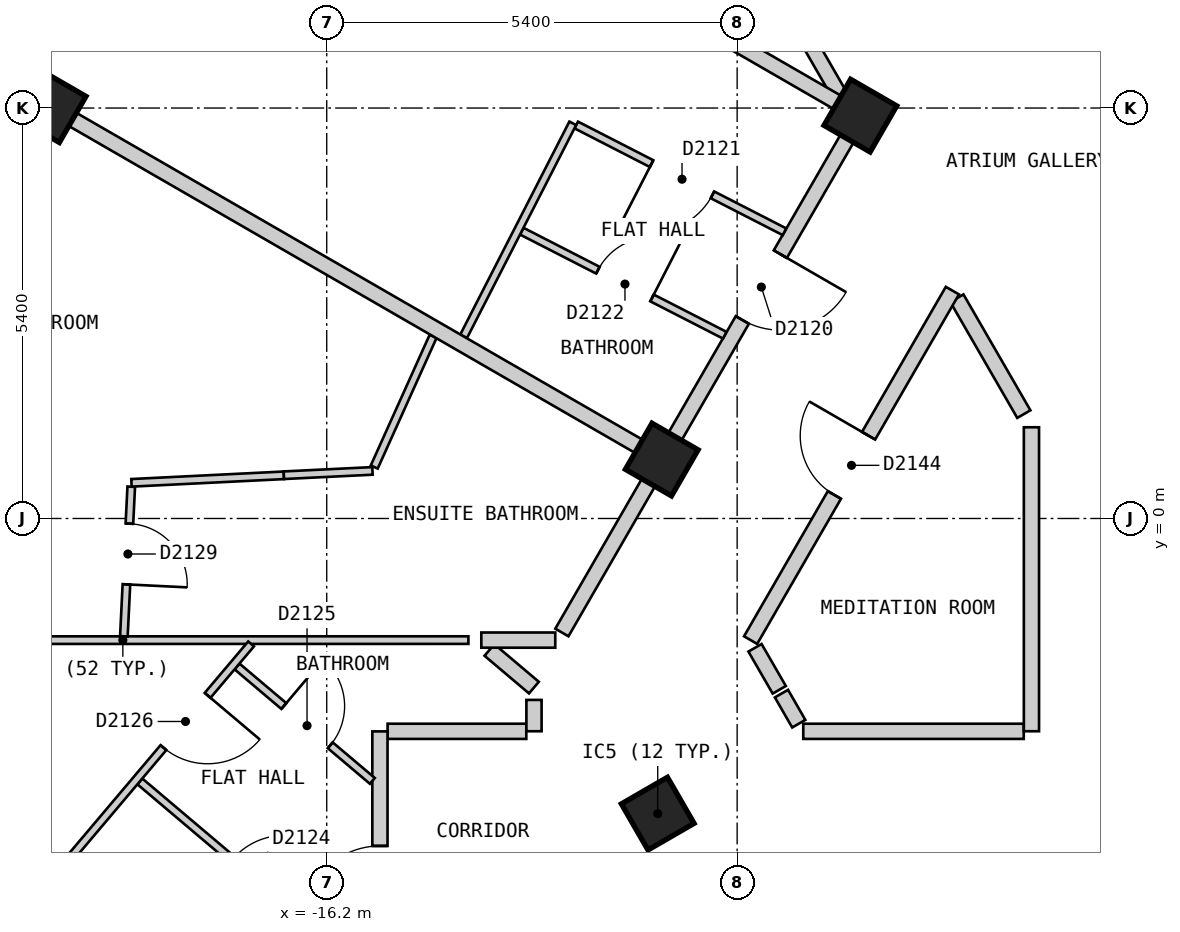
"""IFC4 building model, lengths in metres.
Left out: names, types, materials, properties, quantities, classifications, styles, units other than length and angle.
Written with IfcOpenShell. Run it as: python <this file> out.ifc"""

import sys

from ifc_helpers import new_model, si_unit, direction, frame, frame_2d, origin, origin_2d, place, context, subcontext, project, spatial, polyline, rectangle, outline, extrude, element, fill, save


model = new_model("IFC4")
c1 = context("Model", 3, precision=1e-05, world=origin(), true_north=direction((0.0, 1.0)))
c2 = subcontext(c1, "Body", "Model", "MODEL_VIEW")
j1 = project(units=[si_unit("LENGTHUNIT", "METRE"), si_unit("PLANEANGLEUNIT", "RADIAN")], contexts=[c1])
p1 = place(None, origin())
s1 = spatial("IfcSite", under=j1, at=p1, CompositionType="ELEMENT")
p2 = place(p1, origin())
s2 = spatial("IfcBuilding", under=s1, at=p2, CompositionType="ELEMENT")
p3 = place(p2, frame((0.0, 0.0, 205.8)))
s3 = spatial("IfcBuildingStorey", under=s2, at=p3, CompositionType="ELEMENT", Elevation=205.8)
for number, where, z_axis, x_axis in (
    (1, (-19.846, 5.425, 0.0), (0.0, 0.0, 1.0), (-0.5, -0.866, 0.0)),
    (2, (-11.845, -3.883, 0.0), (0.0, 0.0, 1.0), (0.5, -0.866, 0.0)),
    (3, (-9.179, 5.3, 0.0), (0.0, 0.0, 1.0), (-0.5, -0.866, 0.0)),
    (4, (-11.792, 0.775, 0.0), (0.0, 0.0, 1.0), (-0.5, -0.866, 0.0)),
):
    element("IfcColumn", number, at=place(p3, frame(where, z_axis=z_axis, x_axis=x_axis)), inside=s3, PredefinedType="COLUMN", context=c2, shape_type="SweptSolid", body=[
        extrude(rectangle(XDim=0.7, YDim=0.7, at=origin_2d()), origin(), (0.0, 0.0, 1.0), 3.0),
    ])
p4 = place(p3, frame((-12.514, 20.025, 0.0), z_axis=(0.0, 0.0, 1.0), x_axis=(-0.500003656944, -0.866023292436, 0.0)))
e5 = element("IfcWall", 5, at=p4, inside=s3, PredefinedType="SOLIDWALL", context=c2, shape_type="SweptSolid", body=[
    extrude(outline(polyline([(0.0, -0.15), (22.17, -0.15), (22.09, 0.15), (0.08, 0.15), (0.0, -0.15)])), origin(), (0.0, 0.0, 1.0), 2.7),
])
p5 = place(p4, frame((2.497, 0.0, 0.15)))
e6 = element("IfcOpeningElement", 6, at=p5, cuts=e5, PredefinedType="OPENING", context=c2, shape_type="SweptSolid", body=[
    extrude(rectangle(XDim=1.5, YDim=2.1, at=frame_2d((0.75, 1.05))), frame((0.0, 0.16, 0.0), z_axis=(0.0, -1.0, 0.0), x_axis=(1.0, 0.0, 0.0)), (0.0, 0.0, 1.0), 0.32),
])
p6 = place(p4, frame((7.722, 0.0, 0.15)))
e7 = element("IfcOpeningElement", 7, at=p6, cuts=e5, PredefinedType="OPENING", context=c2, shape_type="SweptSolid", body=[
    extrude(rectangle(XDim=1.5, YDim=2.1, at=frame_2d((0.75, 1.05))), frame((0.0, 0.16, 0.0), z_axis=(0.0, -1.0, 0.0), x_axis=(1.0, 0.0, 0.0)), (0.0, 0.0, 1.0), 0.32),
])
p7 = place(p4, frame((12.948, 0.0, 0.15)))
e8 = element("IfcOpeningElement", 8, at=p7, cuts=e5, PredefinedType="OPENING", context=c2, shape_type="SweptSolid", body=[
    extrude(rectangle(XDim=1.5, YDim=2.1, at=frame_2d((0.75, 1.05))), frame((0.0, 0.16, 0.0), z_axis=(0.0, -1.0, 0.0), x_axis=(1.0, 0.0, 0.0)), (0.0, 0.0, 1.0), 0.32),
])
p8 = place(p4, frame((18.173, 0.0, 0.15)))
e9 = element("IfcOpeningElement", 9, at=p8, cuts=e5, PredefinedType="OPENING", context=c2, shape_type="SweptSolid", body=[
    extrude(rectangle(XDim=1.5, YDim=2.1, at=frame_2d((0.75, 1.05))), frame((0.0, 0.16, 0.0), z_axis=(0.0, -1.0, 0.0), x_axis=(1.0, 0.0, 0.0)), (0.0, 0.0, 1.0), 0.32),
])
p9 = place(p3, frame((-23.599, -4.025, 0.0), z_axis=(0.0, 0.0, 1.0), x_axis=(0.500012653391, -0.866018098222, 0.0)))
e10 = element("IfcWall", 10, at=p9, inside=s3, PredefinedType="SOLIDWALL", context=c2, shape_type="SweptSolid", body=[
    extrude(outline(polyline([(0.0, -0.15), (16.628, -0.15), (16.548, 0.15), (0.08, 0.15), (0.0, -0.15)])), origin(), (0.0, 0.0, 1.0), 2.7),
])
p10 = place(p9, frame((2.444, 0.0, 0.15)))
e11 = element("IfcOpeningElement", 11, at=p10, cuts=e10, PredefinedType="OPENING", context=c2, shape_type="SweptSolid", body=[
    extrude(rectangle(XDim=1.5, YDim=2.1, at=frame_2d((0.75, 1.05))), frame((0.0, 0.16, 0.0), z_axis=(0.0, -1.0, 0.0), x_axis=(1.0, 0.0, 0.0)), (0.0, 0.0, 1.0), 0.32),
])
p11 = place(p9, frame((7.564, 0.0, 0.15)))
e12 = element("IfcOpeningElement", 12, at=p11, cuts=e10, PredefinedType="OPENING", context=c2, shape_type="SweptSolid", body=[
    extrude(rectangle(XDim=1.5, YDim=2.1, at=frame_2d((0.75, 1.05))), frame((0.0, 0.16, 0.0), z_axis=(0.0, -1.0, 0.0), x_axis=(1.0, 0.0, 0.0)), (0.0, 0.0, 1.0), 0.32),
])
p12 = place(p9, frame((12.682, 0.0, 0.15)))
e13 = element("IfcOpeningElement", 13, at=p12, cuts=e10, PredefinedType="OPENING", context=c2, shape_type="SweptSolid", body=[
    extrude(rectangle(XDim=1.5, YDim=2.1, at=frame_2d((0.75, 1.05))), frame((0.0, 0.16, 0.0), z_axis=(0.0, -1.0, 0.0), x_axis=(1.0, 0.0, 0.0)), (0.0, 0.0, 1.0), 0.32),
])
p13 = place(p3, frame((-10.796, 7.9, 0.0), z_axis=(0.0, 0.0, 1.0), x_axis=(0.499698840221, -0.866199208659, 0.0)))
e14 = element("IfcWall", 14, at=p13, inside=s3, PredefinedType="PARTITIONING", context=c2, shape_type="SweptSolid", body=[
    extrude(rectangle(XDim=2.685, YDim=0.2, at=frame_2d((1.343, 0.0))), origin(), (0.0, 0.0, 1.0), 2.7),
])
p14 = place(p3, frame((-7.909, 2.898, 0.0), z_axis=(0.0, 0.0, 1.0), x_axis=(0.50019444547, -0.865913111531, 0.0)))
e15 = element("IfcWall", 15, at=p14, inside=s3, PredefinedType="PARTITIONING", context=c2, shape_type="SweptSolid", body=[
    extrude(rectangle(XDim=1.761, YDim=0.2, at=frame_2d((0.88, 0.0))), origin(), (0.0, 0.0, 1.0), 2.7),
])
p15 = place(p3, frame((-10.565, -1.701, 0.0), z_axis=(0.0, 0.0, 1.0), x_axis=(0.499512735409, -0.866306543416, 0.0)))
e16 = element("IfcWall", 16, at=p15, inside=s3, PredefinedType="PARTITIONING", context=c2, shape_type="SweptSolid", body=[
    extrude(rectangle(XDim=0.638, YDim=0.2, at=frame_2d((0.319, 0.0))), origin(), (0.0, 0.0, 1.0), 2.7),
])
p16 = place(p3, frame((-10.217, -2.304, 0.0), z_axis=(0.0, 0.0, 1.0), x_axis=(0.499013081552, -0.866594452117, 0.0)))
e17 = element("IfcWall", 17, at=p16, inside=s3, PredefinedType="PARTITIONING", context=c2, shape_type="SweptSolid", body=[
    extrude(rectangle(XDim=0.457, YDim=0.2, at=frame_2d((0.229, 0.0))), origin(), (0.0, 0.0, 1.0), 2.7),
])
p17 = place(p3, frame((-15.399, -2.8, 0.0), z_axis=(0.0, 0.0, 1.0), x_axis=(1.0, 0.0, 0.0)))
e18 = element("IfcWall", 18, at=p17, inside=s3, PredefinedType="PARTITIONING", context=c2, shape_type="SweptSolid", body=[
    extrude(rectangle(XDim=1.825, YDim=0.2, at=frame_2d((0.913, 0.0))), origin(), (0.0, 0.0, 1.0), 2.7),
])
p18 = place(p3, frame((-9.93, -2.8, 0.0), z_axis=(0.0, 0.0, 1.0), x_axis=(1.0, 0.0, 0.0)))
e19 = element("IfcWall", 19, at=p18, inside=s3, PredefinedType="PARTITIONING", context=c2, shape_type="SweptSolid", body=[
    extrude(rectangle(XDim=2.901, YDim=0.2, at=frame_2d((1.45, 0.0))), origin(), (0.0, 0.0, 1.0), 2.7),
])
p19 = place(p3, frame((-10.623, -1.6, 0.0), z_axis=(0.0, 0.0, 1.0), x_axis=(0.500040865889, 0.866001808567, 0.0)))
e20 = element("IfcWall", 20, at=p19, inside=s3, PredefinedType="PARTITIONING", context=c2, shape_type="SweptSolid", body=[
    extrude(rectangle(XDim=5.31, YDim=0.2, at=frame_2d((2.655, 0.0))), origin(), (0.0, 0.0, 1.0), 2.7),
])
p20 = place(p19, frame((2.205, 0.0, 0.0)))
e21 = element("IfcOpeningElement", 21, at=p20, cuts=e20, PredefinedType="OPENING", context=c2, shape_type="SweptSolid", body=[
    extrude(rectangle(XDim=0.9, YDim=2.1, at=frame_2d((0.45, 1.05))), frame((0.0, 0.11, 0.0), z_axis=(0.0, -1.0, 0.0), x_axis=(1.0, 0.0, 0.0)), (0.0, 0.0, 1.0), 0.22),
])
p21 = place(p3, frame((-13.106, -1.5, 0.0), z_axis=(0.0, 0.0, 1.0), x_axis=(0.500025705601, 0.86601056214, 0.0)))
e22 = element("IfcWall", 22, at=p21, inside=s3, PredefinedType="PARTITIONING", context=c2, shape_type="SweptSolid", body=[
    extrude(rectangle(XDim=7.735, YDim=0.2, at=frame_2d((3.868, 0.0))), origin(), (0.0, 0.0, 1.0), 2.7),
])
p22 = place(p21, frame((4.748, 0.0, 0.0)))
e23 = element("IfcOpeningElement", 23, at=p22, cuts=e22, PredefinedType="OPENING", context=c2, shape_type="SweptSolid", body=[
    extrude(rectangle(XDim=1.0, YDim=2.1, at=frame_2d((0.5, 1.05))), frame((0.0, 0.11, 0.0), z_axis=(0.0, -1.0, 0.0), x_axis=(1.0, 0.0, 0.0)), (0.0, 0.0, 1.0), 0.22),
])
p23 = place(p3, frame((-6.928, -2.799, 0.0), z_axis=(0.0, 0.0, 1.0), x_axis=(0.0, 1.0, 0.0)))
e24 = element("IfcWall", 24, at=p23, inside=s3, PredefinedType="PARTITIONING", context=c2, shape_type="SweptSolid", body=[
    extrude(rectangle(XDim=3.999, YDim=0.2, at=frame_2d((2.0, 0.0))), origin(), (0.0, 0.0, 1.0), 2.7),
])
p24 = place(p3, frame((-13.473, -2.799, 0.0), z_axis=(0.0, 0.0, 1.0), x_axis=(0.0, 1.0, 0.0)))
e25 = element("IfcWall", 25, at=p24, inside=s3, PredefinedType="PARTITIONING", context=c2, shape_type="SweptSolid", body=[
    extrude(rectangle(XDim=0.412, YDim=0.2, at=frame_2d((0.206, 0.0))), origin(), (0.0, 0.0, 1.0), 2.7),
])
p25 = place(p3, frame((-15.5, -6.599, 0.0), z_axis=(0.0, 0.0, 1.0), x_axis=(0.0, 1.0, 0.0)))
e26 = element("IfcWall", 26, at=p25, inside=s3, PredefinedType="PARTITIONING", context=c2, shape_type="SweptSolid", body=[
    extrude(rectangle(XDim=3.798, YDim=0.2, at=frame_2d((1.899, 0.0))), origin(), (0.0, 0.0, 1.0), 2.7),
])
p26 = place(p25, frame((1.291, 0.0, 0.0)))
e27 = element("IfcOpeningElement", 27, at=p26, cuts=e26, PredefinedType="OPENING", context=c2, shape_type="SweptSolid", body=[
    extrude(rectangle(XDim=1.0, YDim=2.1, at=frame_2d((0.5, 1.05))), frame((0.0, 0.11, 0.0), z_axis=(0.0, -1.0, 0.0), x_axis=(1.0, 0.0, 0.0)), (0.0, 0.0, 1.0), 0.22),
])
p27 = place(p3, frame((-12.917, 5.177, 0.0), z_axis=(0.0, 0.0, 1.0), x_axis=(0.889829844516, -0.456292502467, 0.0)))
e28 = element("IfcWall", 28, at=p27, inside=s3, PredefinedType="PARTITIONING", context=c2, shape_type="SweptSolid", body=[
    extrude(rectangle(XDim=3.079, YDim=0.1, at=frame_2d((1.54, 0.0))), origin(), (0.0, 0.0, 1.0), 2.7),
])
p28 = place(p27, frame((1.114, 0.0, 0.0)))
e29 = element("IfcOpeningElement", 29, at=p28, cuts=e28, PredefinedType="OPENING", context=c2, shape_type="SweptSolid", body=[
    extrude(rectangle(XDim=0.9, YDim=2.1, at=frame_2d((0.45, 1.05))), frame((0.0, 0.06, 0.0), z_axis=(0.0, -1.0, 0.0), x_axis=(1.0, 0.0, 0.0)), (0.0, 0.0, 1.0), 0.12),
])
p29 = place(p3, frame((-13.634, 3.78, 0.0), z_axis=(0.0, 0.0, 1.0), x_axis=(0.889908901513, -0.456138298116, 0.0)))
e30 = element("IfcWall", 30, at=p29, inside=s3, PredefinedType="PARTITIONING", context=c2, shape_type="SweptSolid", body=[
    extrude(rectangle(XDim=3.002, YDim=0.1, at=frame_2d((1.501, 0.0))), origin(), (0.0, 0.0, 1.0), 2.7),
])
p30 = place(p29, frame((1.126, 0.0, 0.0)))
e31 = element("IfcOpeningElement", 31, at=p30, cuts=e30, PredefinedType="OPENING", context=c2, shape_type="SweptSolid", body=[
    extrude(rectangle(XDim=0.8, YDim=2.1, at=frame_2d((0.4, 1.05))), frame((0.0, 0.06, 0.0), z_axis=(0.0, -1.0, 0.0), x_axis=(1.0, 0.0, 0.0)), (0.0, 0.0, 1.0), 0.12),
])
p31 = place(p3, frame((-17.38, -1.947, 0.0), z_axis=(0.0, 0.0, 1.0), x_axis=(0.763616683524, -0.645669854217, 0.0)))
e32 = element("IfcWall", 32, at=p31, inside=s3, PredefinedType="PARTITIONING", context=c2, shape_type="SweptSolid", body=[
    extrude(rectangle(XDim=2.331, YDim=0.1, at=frame_2d((1.166, 0.0))), origin(), (0.0, 0.0, 1.0), 2.7),
])
p32 = place(p31, frame((0.806, 0.0, 0.0)))
e33 = element("IfcOpeningElement", 33, at=p32, cuts=e32, PredefinedType="OPENING", context=c2, shape_type="SweptSolid", body=[
    extrude(rectangle(XDim=0.8, YDim=2.1, at=frame_2d((0.4, 1.05))), frame((0.0, 0.06, 0.0), z_axis=(0.0, -1.0, 0.0), x_axis=(1.0, 0.0, 0.0)), (0.0, 0.0, 1.0), 0.12),
])
p33 = place(p3, frame((-18.659, -3.459, 0.0), z_axis=(0.0, 0.0, 1.0), x_axis=(0.763550385572, -0.64574825489, 0.0)))
e34 = element("IfcWall", 34, at=p33, inside=s3, PredefinedType="PARTITIONING", context=c2, shape_type="SweptSolid", body=[
    extrude(rectangle(XDim=4.006, YDim=0.1, at=frame_2d((2.003, 0.0))), origin(), (0.0, 0.0, 1.0), 2.7),
])
p34 = place(p33, frame((1.593, 0.0, 0.0)))
e35 = element("IfcOpeningElement", 35, at=p34, cuts=e34, PredefinedType="OPENING", context=c2, shape_type="SweptSolid", body=[
    extrude(rectangle(XDim=0.9, YDim=2.1, at=frame_2d((0.45, 1.05))), frame((0.0, 0.06, 0.0), z_axis=(0.0, -1.0, 0.0), x_axis=(1.0, 0.0, 0.0)), (0.0, 0.0, 1.0), 0.12),
])
p35 = place(p3, frame((-23.429, -1.601, 0.0), z_axis=(0.0, 0.0, 1.0), x_axis=(0.999999994233, 0.000107396965, 0.0)))
e36 = element("IfcWall", 36, at=p35, inside=s3, PredefinedType="PARTITIONING", context=c2, shape_type="SweptSolid", body=[
    extrude(rectangle(XDim=9.093, YDim=0.1, at=frame_2d((4.546, 0.0))), origin(), (0.0, 0.0, 1.0), 2.7),
])
p36 = place(p35, frame((1.829, 0.0, 0.0)))
e37 = element("IfcOpeningElement", 37, at=p36, cuts=e36, PredefinedType="OPENING", context=c2, shape_type="SweptSolid", body=[
    extrude(rectangle(XDim=0.9, YDim=2.1, at=frame_2d((0.45, 1.05))), frame((0.0, 0.06, 0.0), z_axis=(0.0, -1.0, 0.0), x_axis=(1.0, 0.0, 0.0)), (0.0, 0.0, 1.0), 0.12),
])
p37 = place(p3, frame((-20.188, -5.191, 0.0), z_axis=(0.0, 0.0, 1.0), x_axis=(0.645524337256, 0.763739700429, 0.0)))
e38 = element("IfcWall", 38, at=p37, inside=s3, PredefinedType="PARTITIONING", context=c2, shape_type="SweptSolid", body=[
    extrude(rectangle(XDim=4.636, YDim=0.1, at=frame_2d((2.318, 0.0))), origin(), (0.0, 0.0, 1.0), 2.7),
])
p38 = place(p37, frame((2.85, 0.0, 0.0)))
e39 = element("IfcOpeningElement", 39, at=p38, cuts=e38, PredefinedType="OPENING", context=c2, shape_type="SweptSolid", body=[
    extrude(rectangle(XDim=0.9, YDim=2.1, at=frame_2d((0.45, 1.05))), frame((0.0, 0.06, 0.0), z_axis=(0.0, -1.0, 0.0), x_axis=(1.0, 0.0, 0.0)), (0.0, 0.0, 1.0), 0.12),
])
p39 = place(p3, frame((-15.575, 0.677, 0.0), z_axis=(0.0, 0.0, 1.0), x_axis=(0.410768223147, 0.911739802165, 0.0)))
e40 = element("IfcWall", 40, at=p39, inside=s3, PredefinedType="PARTITIONING", context=c2, shape_type="SweptSolid", body=[
    extrude(rectangle(XDim=1.886, YDim=0.1, at=frame_2d((0.943, 0.0))), origin(), (0.0, 0.0, 1.0), 2.7),
])
p40 = place(p3, frame((-14.399, 2.396, 0.0), z_axis=(0.0, 0.0, 1.0), x_axis=(0.455967231787, 0.889996563778, 0.0)))
e41 = element("IfcWall", 41, at=p40, inside=s3, PredefinedType="PARTITIONING", context=c2, shape_type="SweptSolid", body=[
    extrude(rectangle(XDim=3.149, YDim=0.1, at=frame_2d((1.575, 0.0))), origin(), (0.0, 0.0, 1.0), 2.7),
])
p41 = place(p3, frame((-18.869, -1.55, 0.0), z_axis=(0.0, 0.0, 1.0), x_axis=(0.049189853645, 0.998789446429, 0.0)))
e42 = element("IfcWall", 42, at=p41, inside=s3, PredefinedType="PARTITIONING", context=c2, shape_type="SweptSolid", body=[
    extrude(rectangle(XDim=1.97, YDim=0.1, at=frame_2d((0.985, 0.0))), origin(), (0.0, 0.0, 1.0), 2.7),
])
p42 = place(p41, frame((0.684, 0.0, 0.0)))
e43 = element("IfcOpeningElement", 43, at=p42, cuts=e42, PredefinedType="OPENING", context=c2, shape_type="SweptSolid", body=[
    extrude(rectangle(XDim=0.8, YDim=2.1, at=frame_2d((0.4, 1.05))), frame((0.0, 0.06, 0.0), z_axis=(0.0, -1.0, 0.0), x_axis=(1.0, 0.0, 0.0)), (0.0, 0.0, 1.0), 0.12),
])
p43 = place(p3, frame((-18.769, 0.469, 0.0), z_axis=(0.0, 0.0, 1.0), x_axis=(0.998780383332, 0.049373534108, 0.0)))
e44 = element("IfcWall", 44, at=p43, inside=s3, PredefinedType="PARTITIONING", context=c2, shape_type="SweptSolid", body=[
    extrude(rectangle(XDim=2.008, YDim=0.1, at=frame_2d((1.004, 0.0))), origin(), (0.0, 0.0, 1.0), 2.7),
])
p44 = place(p3, frame((-16.764, 0.569, 0.0), z_axis=(0.0, 0.0, 1.0), x_axis=(0.998812102885, 0.048727642373, 0.0)))
e45 = element("IfcWall", 45, at=p44, inside=s3, PredefinedType="PARTITIONING", context=c2, shape_type="SweptSolid", body=[
    extrude(rectangle(XDim=1.167, YDim=0.1, at=frame_2d((0.584, 0.0))), origin(), (0.0, 0.0, 1.0), 2.7),
])
p45 = place(p3, frame((-20.539, 5.825, 0.0), z_axis=(0.0, 0.0, 1.0), x_axis=(0.866046068403, -0.499964206122, 0.0)))
e46 = element("IfcWall", 46, at=p45, inside=s3, PredefinedType="PARTITIONING", context=c2, shape_type="SweptSolid", body=[
    extrude(rectangle(XDim=9.995, YDim=0.2, at=frame_2d((4.998, 0.0))), origin(), (0.0, 0.0, 1.0), 2.7),
])
p46 = place(p3, frame((-17.926, 10.35, 0.0), z_axis=(0.0, 0.0, 1.0), x_axis=(0.866018411306, -0.500012111133, 0.0)))
e47 = element("IfcWall", 47, at=p46, inside=s3, PredefinedType="PARTITIONING", context=c2, shape_type="SweptSolid", body=[
    extrude(rectangle(XDim=9.898, YDim=0.2, at=frame_2d((4.949, 0.0))), origin(), (0.0, 0.0, 1.0), 2.7),
])
p47 = place(p3, frame((-14.059, -1.73, 0.0), z_axis=(0.0, 0.0, 1.0), x_axis=(0.763289607824, -0.64605647941, 0.0)))
e48 = element("IfcWall", 48, at=p47, inside=s3, PredefinedType="PARTITIONING", context=c2, shape_type="SweptSolid", body=[
    extrude(rectangle(XDim=0.766, YDim=0.2, at=frame_2d((0.383, 0.0))), origin(), (0.0, 0.0, 1.0), 2.7),
])
p48 = place(p3, frame((-14.166, -1.6, 0.0), z_axis=(0.0, 0.0, 1.0), x_axis=(1.0, 0.0, 0.0)))
e49 = element("IfcWall", 49, at=p48, inside=s3, PredefinedType="PARTITIONING", context=c2, shape_type="SweptSolid", body=[
    extrude(rectangle(XDim=0.973, YDim=0.2, at=frame_2d((0.486, 0.0))), origin(), (0.0, 0.0, 1.0), 2.7),
])
p49 = place(p22, origin())
e50 = element("IfcDoor", 50, at=p49, inside=s3, OperationType="SINGLE_SWING_RIGHT", PredefinedType="DOOR", context=c2, shape_type="SweptSolid", body=[
    extrude(rectangle(XDim=1.0, YDim=2.1, at=frame_2d((0.5, 1.05))), frame((0.0, 0.025, 0.0), z_axis=(0.0, -1.0, 0.0), x_axis=(1.0, 0.0, 0.0)), (0.0, 0.0, 1.0), 0.05),
])
fill(e23, e50)
p50 = place(p28, origin())
e51 = element("IfcDoor", 51, at=p50, inside=s3, OperationType="SINGLE_SWING_LEFT", PredefinedType="DOOR", context=c2, shape_type="SweptSolid", body=[
    extrude(rectangle(XDim=0.9, YDim=2.1, at=frame_2d((0.45, 1.05))), frame((0.0, 0.025, 0.0), z_axis=(0.0, -1.0, 0.0), x_axis=(1.0, 0.0, 0.0)), (0.0, 0.0, 1.0), 0.05),
])
fill(e29, e51)
p51 = place(p30, origin())
e52 = element("IfcDoor", 52, at=p51, inside=s3, OperationType="SINGLE_SWING_RIGHT", PredefinedType="DOOR", context=c2, shape_type="SweptSolid", body=[
    extrude(rectangle(XDim=0.8, YDim=2.1, at=frame_2d((0.4, 1.05))), frame((0.0, 0.025, 0.0), z_axis=(0.0, -1.0, 0.0), x_axis=(1.0, 0.0, 0.0)), (0.0, 0.0, 1.0), 0.05),
])
fill(e31, e52)
p52 = place(p26, origin())
e53 = element("IfcDoor", 53, at=p52, inside=s3, OperationType="SINGLE_SWING_LEFT", PredefinedType="DOOR", context=c2, shape_type="SweptSolid", body=[
    extrude(rectangle(XDim=1.0, YDim=2.1, at=frame_2d((0.5, 1.05))), frame((0.0, 0.025, 0.0), z_axis=(0.0, -1.0, 0.0), x_axis=(1.0, 0.0, 0.0)), (0.0, 0.0, 1.0), 0.05),
])
fill(e27, e53)
p53 = place(p32, origin())
e54 = element("IfcDoor", 54, at=p53, inside=s3, OperationType="SINGLE_SWING_LEFT", PredefinedType="DOOR", context=c2, shape_type="SweptSolid", body=[
    extrude(rectangle(XDim=0.8, YDim=2.1, at=frame_2d((0.4, 1.05))), frame((0.0, 0.025, 0.0), z_axis=(0.0, -1.0, 0.0), x_axis=(1.0, 0.0, 0.0)), (0.0, 0.0, 1.0), 0.05),
])
fill(e33, e54)
p54 = place(p38, origin())
e55 = element("IfcDoor", 55, at=p54, inside=s3, OperationType="SINGLE_SWING_RIGHT", PredefinedType="DOOR", context=c2, shape_type="SweptSolid", body=[
    extrude(rectangle(XDim=0.9, YDim=2.1, at=frame_2d((0.45, 1.05))), frame((0.0, 0.025, 0.0), z_axis=(0.0, -1.0, 0.0), x_axis=(1.0, 0.0, 0.0)), (0.0, 0.0, 1.0), 0.05),
])
fill(e39, e55)
p55 = place(p42, origin())
e56 = element("IfcDoor", 56, at=p55, inside=s3, OperationType="SINGLE_SWING_LEFT", PredefinedType="DOOR", context=c2, shape_type="SweptSolid", body=[
    extrude(rectangle(XDim=0.8, YDim=2.1, at=frame_2d((0.4, 1.05))), frame((0.0, 0.025, 0.0), z_axis=(0.0, -1.0, 0.0), x_axis=(1.0, 0.0, 0.0)), (0.0, 0.0, 1.0), 0.05),
])
fill(e43, e56)
p56 = place(p20, origin())
e57 = element("IfcDoor", 57, at=p56, inside=s3, OperationType="SINGLE_SWING_RIGHT", PredefinedType="DOOR", context=c2, shape_type="SweptSolid", body=[
    extrude(rectangle(XDim=0.9, YDim=2.1, at=frame_2d((0.45, 1.05))), frame((0.0, 0.025, 0.0), z_axis=(0.0, -1.0, 0.0), x_axis=(1.0, 0.0, 0.0)), (0.0, 0.0, 1.0), 0.05),
])
fill(e21, e57)
save(model, sys.argv[1])
